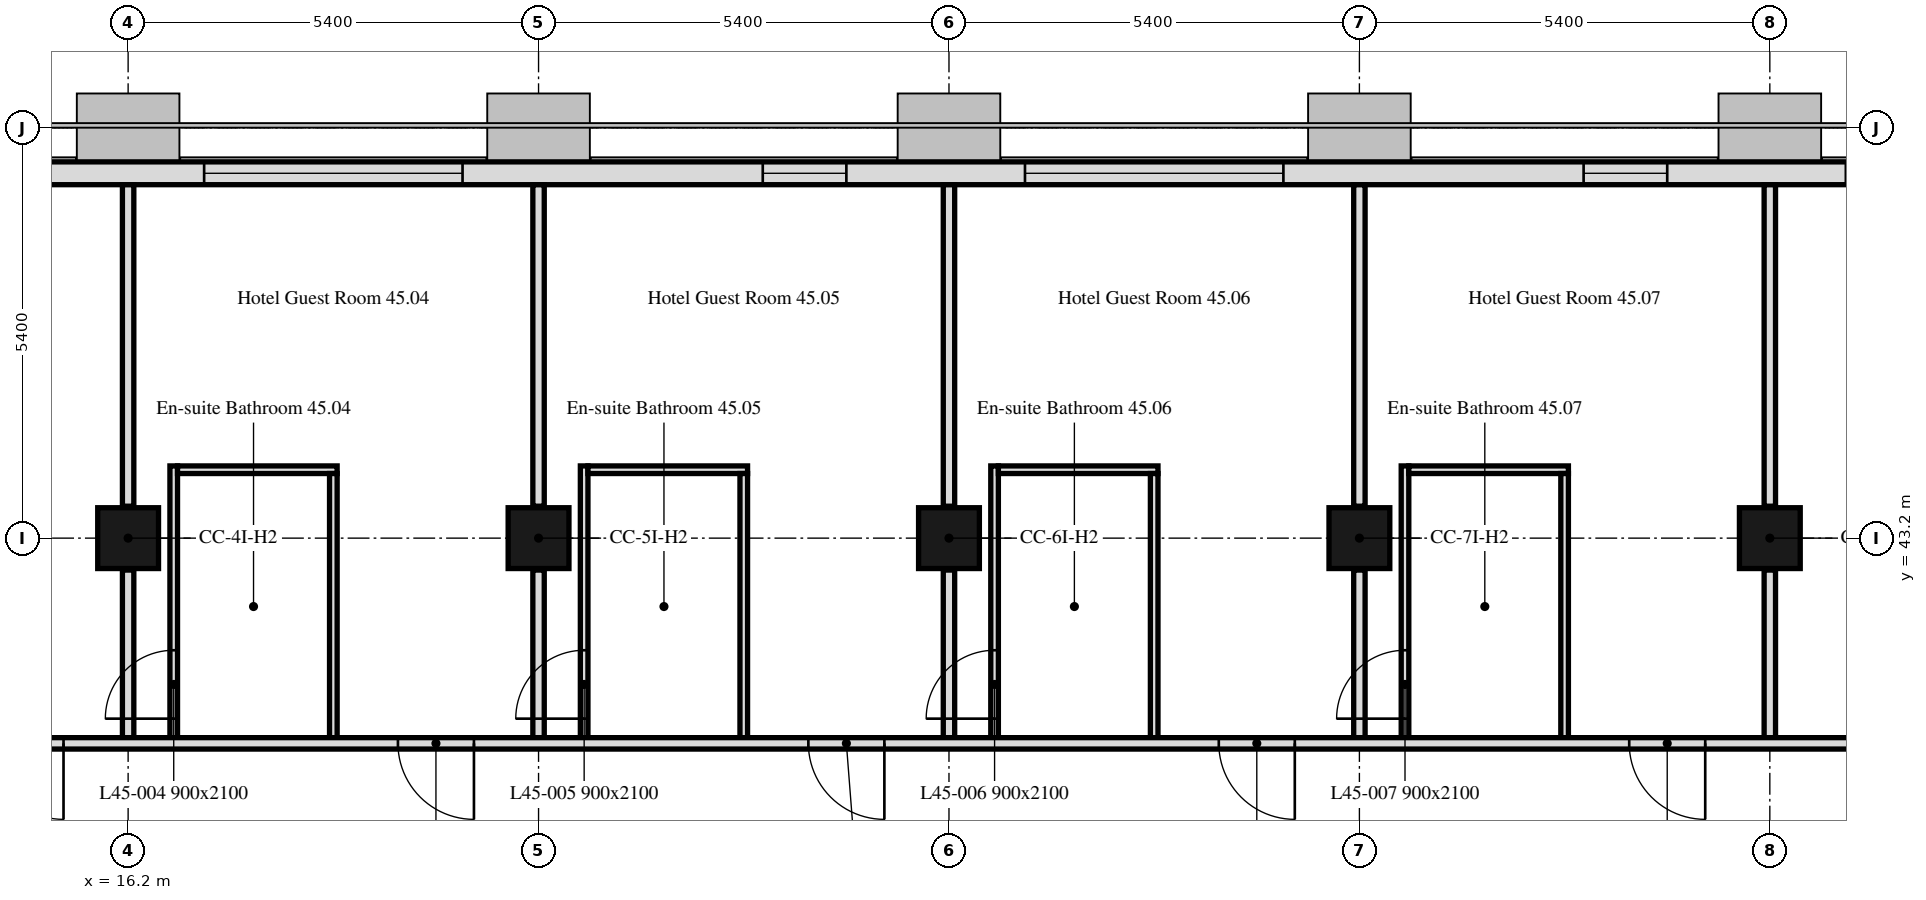
"""IFC4 building model, lengths in metres.
Left out: names, types, materials, properties, quantities, classifications, styles, units other than length and angle.
Written with IfcOpenShell. Run it as: python <this file> out.ifc"""

import sys

from ifc_helpers import new_model, si_unit, direction, frame, frame_2d, origin, origin_2d, place, context, subcontext, project, spatial, rectangle, extrude, element, fill, save


model = new_model("IFC4")
c1 = context("Model", 3, precision=1e-05, world=origin(), true_north=direction((0.0, 1.0)))
c2 = subcontext(c1, "Body", "Model", "MODEL_VIEW")
j1 = project(units=[si_unit("LENGTHUNIT", "METRE"), si_unit("PLANEANGLEUNIT", "RADIAN")], contexts=[c1])
p1 = place(None, origin())
s1 = spatial("IfcSite", under=j1, at=p1, CompositionType="ELEMENT")
p2 = place(p1, origin())
s2 = spatial("IfcBuilding", under=s1, at=p2, CompositionType="ELEMENT")
p3 = place(p2, frame((0.0, 0.0, 187.3)))
s3 = spatial("IfcBuildingStorey", under=s2, at=p3, CompositionType="ELEMENT", Elevation=187.3)
for number, where, z_axis, x_axis in (
    (1, (16.2, 43.2, 0.0), (0.0, 0.0, 1.0), (1.0, 0.0, 0.0)),
    (2, (21.6, 43.2, 0.0), (0.0, 0.0, 1.0), (1.0, 0.0, 0.0)),
    (3, (27.0, 43.2, 0.0), (0.0, 0.0, 1.0), (1.0, 0.0, 0.0)),
    (4, (32.4, 43.2, 0.0), (0.0, 0.0, 1.0), (1.0, 0.0, 0.0)),
    (5, (37.8, 43.2, 0.0), (0.0, 0.0, 1.0), (1.0, 0.0, 0.0)),
):
    element("IfcColumn", number, at=place(p3, frame(where, z_axis=z_axis, x_axis=x_axis)), inside=s3, PredefinedType="COLUMN", context=c2, shape_type="SweptSolid", body=[
        extrude(rectangle(XDim=0.8, YDim=0.8, at=origin_2d()), origin(), (0.0, 0.0, 1.0), 3.0),
    ])
p4 = place(p3, frame((43.014, 48.0, 0.0), z_axis=(0.0, 0.0, 1.0), x_axis=(-1.0, 0.0, 0.0)))
e6 = element("IfcWall", 6, at=p4, inside=s3, PredefinedType="SOLIDWALL", context=c2, shape_type="SweptSolid", body=[
    extrude(rectangle(XDim=32.027, YDim=0.3, at=frame_2d((16.014, 0.0))), origin(), (0.0, 0.0, 1.0), 3.0),
])
p5 = place(p4, frame((0.814, 0.0, 0.9)))
e7 = element("IfcOpeningElement", 7, at=p5, cuts=e6, PredefinedType="OPENING", context=c2, shape_type="SweptSolid", body=[
    extrude(rectangle(XDim=3.4, YDim=1.7, at=frame_2d((1.7, 0.85))), frame((0.0, 0.16, 0.0), z_axis=(0.0, -1.0, 0.0), x_axis=(1.0, 0.0, 0.0)), (0.0, 0.0, 1.0), 0.32),
])
p6 = place(p4, frame((6.564, 0.0, 0.9)))
e8 = element("IfcOpeningElement", 8, at=p6, cuts=e6, PredefinedType="OPENING", context=c2, shape_type="SweptSolid", body=[
    extrude(rectangle(XDim=1.1, YDim=1.7, at=frame_2d((0.55, 0.85))), frame((0.0, 0.16, 0.0), z_axis=(0.0, -1.0, 0.0), x_axis=(1.0, 0.0, 0.0)), (0.0, 0.0, 1.0), 0.32),
])
p7 = place(p4, frame((11.614, 0.0, 0.9)))
e9 = element("IfcOpeningElement", 9, at=p7, cuts=e6, PredefinedType="OPENING", context=c2, shape_type="SweptSolid", body=[
    extrude(rectangle(XDim=3.4, YDim=1.7, at=frame_2d((1.7, 0.85))), frame((0.0, 0.16, 0.0), z_axis=(0.0, -1.0, 0.0), x_axis=(1.0, 0.0, 0.0)), (0.0, 0.0, 1.0), 0.32),
])
p8 = place(p4, frame((17.364, 0.0, 0.9)))
e10 = element("IfcOpeningElement", 10, at=p8, cuts=e6, PredefinedType="OPENING", context=c2, shape_type="SweptSolid", body=[
    extrude(rectangle(XDim=1.1, YDim=1.7, at=frame_2d((0.55, 0.85))), frame((0.0, 0.16, 0.0), z_axis=(0.0, -1.0, 0.0), x_axis=(1.0, 0.0, 0.0)), (0.0, 0.0, 1.0), 0.32),
])
p9 = place(p4, frame((22.414, 0.0, 0.9)))
e11 = element("IfcOpeningElement", 11, at=p9, cuts=e6, PredefinedType="OPENING", context=c2, shape_type="SweptSolid", body=[
    extrude(rectangle(XDim=3.4, YDim=1.7, at=frame_2d((1.7, 0.85))), frame((0.0, 0.16, 0.0), z_axis=(0.0, -1.0, 0.0), x_axis=(1.0, 0.0, 0.0)), (0.0, 0.0, 1.0), 0.32),
])
p10 = place(p4, frame((28.164, 0.0, 0.9)))
e12 = element("IfcOpeningElement", 12, at=p10, cuts=e6, PredefinedType="OPENING", context=c2, shape_type="SweptSolid", body=[
    extrude(rectangle(XDim=1.1, YDim=1.7, at=frame_2d((0.55, 0.85))), frame((0.0, 0.16, 0.0), z_axis=(0.0, -1.0, 0.0), x_axis=(1.0, 0.0, 0.0)), (0.0, 0.0, 1.0), 0.32),
])
p11 = place(p3, frame((16.2, 40.575, 0.0), z_axis=(0.0, 0.0, 1.0), x_axis=(0.0, 1.0, 0.0)))
e13 = element("IfcWall", 13, at=p11, inside=s3, PredefinedType="PARTITIONING", context=c2, shape_type="SweptSolid", body=[
    extrude(rectangle(XDim=2.205, YDim=0.15, at=frame_2d((1.103, 0.0))), origin(), (0.0, 0.0, 1.0), 2.4),
])
p12 = place(p3, frame((16.2, 43.62, 0.0), z_axis=(0.0, 0.0, 1.0), x_axis=(0.0, 1.0, 0.0)))
e14 = element("IfcWall", 14, at=p12, inside=s3, PredefinedType="PARTITIONING", context=c2, shape_type="SweptSolid", body=[
    extrude(rectangle(XDim=4.229, YDim=0.15, at=frame_2d((2.115, 0.0))), origin(), (0.0, 0.0, 1.0), 2.4),
])
p13 = place(p3, frame((16.8, 40.575, 0.0), z_axis=(0.0, 0.0, 1.0), x_axis=(0.0, 1.0, 0.0)))
e15 = element("IfcWall", 15, at=p13, inside=s3, PredefinedType="PARTITIONING", context=c2, shape_type="SweptSolid", body=[
    extrude(rectangle(XDim=3.575, YDim=0.1, at=frame_2d((1.788, 0.0))), origin(), (0.0, 0.0, 1.0), 3.0),
])
p14 = place(p13, frame((0.25, 0.0, 0.0)))
e16 = element("IfcOpeningElement", 16, at=p14, cuts=e15, PredefinedType="OPENING", context=c2, shape_type="SweptSolid", body=[
    extrude(rectangle(XDim=0.9, YDim=2.1, at=frame_2d((0.45, 1.05))), frame((0.0, 0.05, 0.0), z_axis=(0.0, -1.0, 0.0), x_axis=(1.0, 0.0, 0.0)), (0.0, 0.0, 1.0), 0.1),
])
p15 = place(p3, frame((16.85, 44.1, 0.0), z_axis=(0.0, 0.0, 1.0), x_axis=(1.0, 0.0, 0.0)))
e17 = element("IfcWall", 17, at=p15, inside=s3, PredefinedType="PARTITIONING", context=c2, shape_type="SweptSolid", body=[
    extrude(rectangle(XDim=2.1, YDim=0.1, at=frame_2d((1.05, 0.0))), origin(), (0.0, 0.0, 1.0), 3.0),
])
p16 = place(p3, frame((18.9, 44.05, 0.0), z_axis=(0.0, 0.0, 1.0), x_axis=(0.0, -1.0, 0.0)))
e18 = element("IfcWall", 18, at=p16, inside=s3, PredefinedType="PARTITIONING", context=c2, shape_type="SweptSolid", body=[
    extrude(rectangle(XDim=3.475, YDim=0.1, at=frame_2d((1.738, 0.0))), origin(), (0.0, 0.0, 1.0), 3.0),
])
p17 = place(p3, frame((21.6, 40.575, 0.0), z_axis=(0.0, 0.0, 1.0), x_axis=(0.0, 1.0, 0.0)))
e19 = element("IfcWall", 19, at=p17, inside=s3, PredefinedType="PARTITIONING", context=c2, shape_type="SweptSolid", body=[
    extrude(rectangle(XDim=2.205, YDim=0.15, at=frame_2d((1.103, 0.0))), origin(), (0.0, 0.0, 1.0), 2.4),
])
p18 = place(p3, frame((21.6, 43.62, 0.0), z_axis=(0.0, 0.0, 1.0), x_axis=(0.0, 1.0, 0.0)))
e20 = element("IfcWall", 20, at=p18, inside=s3, PredefinedType="PARTITIONING", context=c2, shape_type="SweptSolid", body=[
    extrude(rectangle(XDim=4.229, YDim=0.15, at=frame_2d((2.115, 0.0))), origin(), (0.0, 0.0, 1.0), 2.4),
])
p19 = place(p3, frame((22.2, 40.575, 0.0), z_axis=(0.0, 0.0, 1.0), x_axis=(0.0, 1.0, 0.0)))
e21 = element("IfcWall", 21, at=p19, inside=s3, PredefinedType="PARTITIONING", context=c2, shape_type="SweptSolid", body=[
    extrude(rectangle(XDim=3.575, YDim=0.1, at=frame_2d((1.788, 0.0))), origin(), (0.0, 0.0, 1.0), 3.0),
])
p20 = place(p19, frame((0.25, 0.0, 0.0)))
e22 = element("IfcOpeningElement", 22, at=p20, cuts=e21, PredefinedType="OPENING", context=c2, shape_type="SweptSolid", body=[
    extrude(rectangle(XDim=0.9, YDim=2.1, at=frame_2d((0.45, 1.05))), frame((0.0, 0.05, 0.0), z_axis=(0.0, -1.0, 0.0), x_axis=(1.0, 0.0, 0.0)), (0.0, 0.0, 1.0), 0.1),
])
p21 = place(p3, frame((22.25, 44.1, 0.0), z_axis=(0.0, 0.0, 1.0), x_axis=(1.0, 0.0, 0.0)))
e23 = element("IfcWall", 23, at=p21, inside=s3, PredefinedType="PARTITIONING", context=c2, shape_type="SweptSolid", body=[
    extrude(rectangle(XDim=2.1, YDim=0.1, at=frame_2d((1.05, 0.0))), origin(), (0.0, 0.0, 1.0), 3.0),
])
p22 = place(p3, frame((24.3, 44.05, 0.0), z_axis=(0.0, 0.0, 1.0), x_axis=(0.0, -1.0, 0.0)))
e24 = element("IfcWall", 24, at=p22, inside=s3, PredefinedType="PARTITIONING", context=c2, shape_type="SweptSolid", body=[
    extrude(rectangle(XDim=3.475, YDim=0.1, at=frame_2d((1.738, 0.0))), origin(), (0.0, 0.0, 1.0), 3.0),
])
p23 = place(p3, frame((27.0, 40.575, 0.0), z_axis=(0.0, 0.0, 1.0), x_axis=(0.0, 1.0, 0.0)))
e25 = element("IfcWall", 25, at=p23, inside=s3, PredefinedType="PARTITIONING", context=c2, shape_type="SweptSolid", body=[
    extrude(rectangle(XDim=2.205, YDim=0.15, at=frame_2d((1.103, 0.0))), origin(), (0.0, 0.0, 1.0), 2.4),
])
p24 = place(p3, frame((27.0, 43.62, 0.0), z_axis=(0.0, 0.0, 1.0), x_axis=(0.0, 1.0, 0.0)))
e26 = element("IfcWall", 26, at=p24, inside=s3, PredefinedType="PARTITIONING", context=c2, shape_type="SweptSolid", body=[
    extrude(rectangle(XDim=4.229, YDim=0.15, at=frame_2d((2.115, 0.0))), origin(), (0.0, 0.0, 1.0), 2.4),
])
p25 = place(p3, frame((27.6, 40.575, 0.0), z_axis=(0.0, 0.0, 1.0), x_axis=(0.0, 1.0, 0.0)))
e27 = element("IfcWall", 27, at=p25, inside=s3, PredefinedType="PARTITIONING", context=c2, shape_type="SweptSolid", body=[
    extrude(rectangle(XDim=3.575, YDim=0.1, at=frame_2d((1.788, 0.0))), origin(), (0.0, 0.0, 1.0), 3.0),
])
p26 = place(p25, frame((0.25, 0.0, 0.0)))
e28 = element("IfcOpeningElement", 28, at=p26, cuts=e27, PredefinedType="OPENING", context=c2, shape_type="SweptSolid", body=[
    extrude(rectangle(XDim=0.9, YDim=2.1, at=frame_2d((0.45, 1.05))), frame((0.0, 0.05, 0.0), z_axis=(0.0, -1.0, 0.0), x_axis=(1.0, 0.0, 0.0)), (0.0, 0.0, 1.0), 0.1),
])
p27 = place(p3, frame((27.65, 44.1, 0.0), z_axis=(0.0, 0.0, 1.0), x_axis=(1.0, 0.0, 0.0)))
e29 = element("IfcWall", 29, at=p27, inside=s3, PredefinedType="PARTITIONING", context=c2, shape_type="SweptSolid", body=[
    extrude(rectangle(XDim=2.1, YDim=0.1, at=frame_2d((1.05, 0.0))), origin(), (0.0, 0.0, 1.0), 3.0),
])
p28 = place(p3, frame((29.7, 44.05, 0.0), z_axis=(0.0, 0.0, 1.0), x_axis=(0.0, -1.0, 0.0)))
e30 = element("IfcWall", 30, at=p28, inside=s3, PredefinedType="PARTITIONING", context=c2, shape_type="SweptSolid", body=[
    extrude(rectangle(XDim=3.475, YDim=0.1, at=frame_2d((1.738, 0.0))), origin(), (0.0, 0.0, 1.0), 3.0),
])
p29 = place(p3, frame((32.4, 40.575, 0.0), z_axis=(0.0, 0.0, 1.0), x_axis=(0.0, 1.0, 0.0)))
e31 = element("IfcWall", 31, at=p29, inside=s3, PredefinedType="PARTITIONING", context=c2, shape_type="SweptSolid", body=[
    extrude(rectangle(XDim=2.205, YDim=0.15, at=frame_2d((1.103, 0.0))), origin(), (0.0, 0.0, 1.0), 2.4),
])
p30 = place(p3, frame((32.4, 43.62, 0.0), z_axis=(0.0, 0.0, 1.0), x_axis=(0.0, 1.0, 0.0)))
e32 = element("IfcWall", 32, at=p30, inside=s3, PredefinedType="PARTITIONING", context=c2, shape_type="SweptSolid", body=[
    extrude(rectangle(XDim=4.229, YDim=0.15, at=frame_2d((2.115, 0.0))), origin(), (0.0, 0.0, 1.0), 2.4),
])
p31 = place(p3, frame((33.0, 40.575, 0.0), z_axis=(0.0, 0.0, 1.0), x_axis=(0.0, 1.0, 0.0)))
e33 = element("IfcWall", 33, at=p31, inside=s3, PredefinedType="PARTITIONING", context=c2, shape_type="SweptSolid", body=[
    extrude(rectangle(XDim=3.575, YDim=0.1, at=frame_2d((1.788, 0.0))), origin(), (0.0, 0.0, 1.0), 3.0),
])
p32 = place(p31, frame((0.25, 0.0, 0.0)))
e34 = element("IfcOpeningElement", 34, at=p32, cuts=e33, PredefinedType="OPENING", context=c2, shape_type="SweptSolid", body=[
    extrude(rectangle(XDim=0.9, YDim=2.1, at=frame_2d((0.45, 1.05))), frame((0.0, 0.05, 0.0), z_axis=(0.0, -1.0, 0.0), x_axis=(1.0, 0.0, 0.0)), (0.0, 0.0, 1.0), 0.1),
])
p33 = place(p3, frame((33.05, 44.1, 0.0), z_axis=(0.0, 0.0, 1.0), x_axis=(1.0, 0.0, 0.0)))
e35 = element("IfcWall", 35, at=p33, inside=s3, PredefinedType="PARTITIONING", context=c2, shape_type="SweptSolid", body=[
    extrude(rectangle(XDim=2.1, YDim=0.1, at=frame_2d((1.05, 0.0))), origin(), (0.0, 0.0, 1.0), 3.0),
])
p34 = place(p3, frame((35.1, 44.05, 0.0), z_axis=(0.0, 0.0, 1.0), x_axis=(0.0, -1.0, 0.0)))
e36 = element("IfcWall", 36, at=p34, inside=s3, PredefinedType="PARTITIONING", context=c2, shape_type="SweptSolid", body=[
    extrude(rectangle(XDim=3.475, YDim=0.1, at=frame_2d((1.738, 0.0))), origin(), (0.0, 0.0, 1.0), 3.0),
])
p35 = place(p3, frame((37.8, 40.575, 0.0), z_axis=(0.0, 0.0, 1.0), x_axis=(0.0, 1.0, 0.0)))
e37 = element("IfcWall", 37, at=p35, inside=s3, PredefinedType="PARTITIONING", context=c2, shape_type="SweptSolid", body=[
    extrude(rectangle(XDim=2.205, YDim=0.15, at=frame_2d((1.103, 0.0))), origin(), (0.0, 0.0, 1.0), 2.4),
])
p36 = place(p3, frame((37.8, 43.62, 0.0), z_axis=(0.0, 0.0, 1.0), x_axis=(0.0, 1.0, 0.0)))
e38 = element("IfcWall", 38, at=p36, inside=s3, PredefinedType="PARTITIONING", context=c2, shape_type="SweptSolid", body=[
    extrude(rectangle(XDim=4.229, YDim=0.15, at=frame_2d((2.115, 0.0))), origin(), (0.0, 0.0, 1.0), 2.4),
])
p37 = place(p3, frame((47.849, 40.5, 0.0), z_axis=(0.0, 0.0, 1.0), x_axis=(-1.0, 0.0, 0.0)))
e39 = element("IfcWall", 39, at=p37, inside=s3, PredefinedType="PARTITIONING", context=c2, shape_type="SweptSolid", body=[
    extrude(rectangle(XDim=41.698, YDim=0.15, at=frame_2d((20.849, 0.0))), origin(), (0.0, 0.0, 1.0), 2.4),
])
p38 = place(p37, frame((37.899, 0.0, 0.0)))
e40 = element("IfcOpeningElement", 40, at=p38, cuts=e39, PredefinedType="OPENING", context=c2, shape_type="SweptSolid", body=[
    extrude(rectangle(XDim=1.0, YDim=2.1, at=frame_2d((0.5, 1.05))), frame((0.0, 0.075, 0.0), z_axis=(0.0, -1.0, 0.0), x_axis=(1.0, 0.0, 0.0)), (0.0, 0.0, 1.0), 0.15),
])
p39 = place(p37, frame((32.499, 0.0, 0.0)))
e41 = element("IfcOpeningElement", 41, at=p39, cuts=e39, PredefinedType="OPENING", context=c2, shape_type="SweptSolid", body=[
    extrude(rectangle(XDim=1.0, YDim=2.1, at=frame_2d((0.5, 1.05))), frame((0.0, 0.075, 0.0), z_axis=(0.0, -1.0, 0.0), x_axis=(1.0, 0.0, 0.0)), (0.0, 0.0, 1.0), 0.15),
])
p40 = place(p37, frame((27.099, 0.0, 0.0)))
e42 = element("IfcOpeningElement", 42, at=p40, cuts=e39, PredefinedType="OPENING", context=c2, shape_type="SweptSolid", body=[
    extrude(rectangle(XDim=1.0, YDim=2.1, at=frame_2d((0.5, 1.05))), frame((0.0, 0.075, 0.0), z_axis=(0.0, -1.0, 0.0), x_axis=(1.0, 0.0, 0.0)), (0.0, 0.0, 1.0), 0.15),
])
p41 = place(p37, frame((21.699, 0.0, 0.0)))
e43 = element("IfcOpeningElement", 43, at=p41, cuts=e39, PredefinedType="OPENING", context=c2, shape_type="SweptSolid", body=[
    extrude(rectangle(XDim=1.0, YDim=2.1, at=frame_2d((0.5, 1.05))), frame((0.0, 0.075, 0.0), z_axis=(0.0, -1.0, 0.0), x_axis=(1.0, 0.0, 0.0)), (0.0, 0.0, 1.0), 0.15),
])
p42 = place(p37, frame((16.299, 0.0, 0.0)))
e44 = element("IfcOpeningElement", 44, at=p42, cuts=e39, PredefinedType="OPENING", context=c2, shape_type="SweptSolid", body=[
    extrude(rectangle(XDim=1.0, YDim=2.1, at=frame_2d((0.5, 1.05))), frame((0.0, 0.075, 0.0), z_axis=(0.0, -1.0, 0.0), x_axis=(1.0, 0.0, 0.0)), (0.0, 0.0, 1.0), 0.15),
])
p43 = place(p37, frame((10.899, 0.0, 0.0)))
e45 = element("IfcOpeningElement", 45, at=p43, cuts=e39, PredefinedType="OPENING", context=c2, shape_type="SweptSolid", body=[
    extrude(rectangle(XDim=1.0, YDim=2.1, at=frame_2d((0.5, 1.05))), frame((0.0, 0.075, 0.0), z_axis=(0.0, -1.0, 0.0), x_axis=(1.0, 0.0, 0.0)), (0.0, 0.0, 1.0), 0.15),
])
p44 = place(p37, frame((2.849, 0.0, 0.0)))
e46 = element("IfcOpeningElement", 46, at=p44, cuts=e39, PredefinedType="OPENING", context=c2, shape_type="SweptSolid", body=[
    extrude(rectangle(XDim=1.0, YDim=2.1, at=frame_2d((0.5, 1.05))), frame((0.0, 0.075, 0.0), z_axis=(0.0, -1.0, 0.0), x_axis=(1.0, 0.0, 0.0)), (0.0, 0.0, 1.0), 0.15),
])
p45 = place(p6, origin())
e47 = element("IfcWindow", 47, at=p45, inside=s3, PartitioningType="SINGLE_PANEL", PredefinedType="WINDOW", context=c2, shape_type="SweptSolid", body=[
    extrude(rectangle(XDim=1.1, YDim=1.7, at=frame_2d((0.55, 0.85))), frame((0.0, 0.03, 0.0), z_axis=(0.0, -1.0, 0.0), x_axis=(1.0, 0.0, 0.0)), (0.0, 0.0, 1.0), 0.06),
])
fill(e8, e47)
p46 = place(p7, origin())
e48 = element("IfcWindow", 48, at=p46, inside=s3, PartitioningType="SINGLE_PANEL", PredefinedType="WINDOW", context=c2, shape_type="SweptSolid", body=[
    extrude(rectangle(XDim=3.4, YDim=1.7, at=frame_2d((1.7, 0.85))), frame((0.0, 0.03, 0.0), z_axis=(0.0, -1.0, 0.0), x_axis=(1.0, 0.0, 0.0)), (0.0, 0.0, 1.0), 0.06),
])
fill(e9, e48)
p47 = place(p8, origin())
e49 = element("IfcWindow", 49, at=p47, inside=s3, PartitioningType="SINGLE_PANEL", PredefinedType="WINDOW", context=c2, shape_type="SweptSolid", body=[
    extrude(rectangle(XDim=1.1, YDim=1.7, at=frame_2d((0.55, 0.85))), frame((0.0, 0.03, 0.0), z_axis=(0.0, -1.0, 0.0), x_axis=(1.0, 0.0, 0.0)), (0.0, 0.0, 1.0), 0.06),
])
fill(e10, e49)
p48 = place(p9, origin())
e50 = element("IfcWindow", 50, at=p48, inside=s3, PartitioningType="SINGLE_PANEL", PredefinedType="WINDOW", context=c2, shape_type="SweptSolid", body=[
    extrude(rectangle(XDim=3.4, YDim=1.7, at=frame_2d((1.7, 0.85))), frame((0.0, 0.03, 0.0), z_axis=(0.0, -1.0, 0.0), x_axis=(1.0, 0.0, 0.0)), (0.0, 0.0, 1.0), 0.06),
])
fill(e11, e50)
p49 = place(p14, origin())
e51 = element("IfcDoor", 51, at=p49, inside=s3, OperationType="SINGLE_SWING_LEFT", PredefinedType="DOOR", context=c2, shape_type="SweptSolid", body=[
    extrude(rectangle(XDim=0.9, YDim=2.1, at=frame_2d((0.45, 1.05))), frame((0.0, 0.025, 0.0), z_axis=(0.0, -1.0, 0.0), x_axis=(1.0, 0.0, 0.0)), (0.0, 0.0, 1.0), 0.05),
])
fill(e16, e51)
p50 = place(p20, origin())
e52 = element("IfcDoor", 52, at=p50, inside=s3, OperationType="SINGLE_SWING_LEFT", PredefinedType="DOOR", context=c2, shape_type="SweptSolid", body=[
    extrude(rectangle(XDim=0.9, YDim=2.1, at=frame_2d((0.45, 1.05))), frame((0.0, 0.025, 0.0), z_axis=(0.0, -1.0, 0.0), x_axis=(1.0, 0.0, 0.0)), (0.0, 0.0, 1.0), 0.05),
])
fill(e22, e52)
p51 = place(p26, origin())
e53 = element("IfcDoor", 53, at=p51, inside=s3, OperationType="SINGLE_SWING_RIGHT", PredefinedType="DOOR", context=c2, shape_type="SweptSolid", body=[
    extrude(rectangle(XDim=0.9, YDim=2.1, at=frame_2d((0.45, 1.05))), frame((0.0, 0.025, 0.0), z_axis=(0.0, -1.0, 0.0), x_axis=(1.0, 0.0, 0.0)), (0.0, 0.0, 1.0), 0.05),
])
fill(e28, e53)
p52 = place(p32, origin())
e54 = element("IfcDoor", 54, at=p52, inside=s3, OperationType="SINGLE_SWING_RIGHT", PredefinedType="DOOR", context=c2, shape_type="SweptSolid", body=[
    extrude(rectangle(XDim=0.9, YDim=2.1, at=frame_2d((0.45, 1.05))), frame((0.0, 0.025, 0.0), z_axis=(0.0, -1.0, 0.0), x_axis=(1.0, 0.0, 0.0)), (0.0, 0.0, 1.0), 0.05),
])
fill(e34, e54)
p53 = place(p39, origin())
e55 = element("IfcDoor", 55, at=p53, inside=s3, OperationType="SINGLE_SWING_LEFT", PredefinedType="DOOR", context=c2, shape_type="SweptSolid", body=[
    extrude(rectangle(XDim=1.0, YDim=2.1, at=frame_2d((0.5, 1.05))), frame((0.0, 0.025, 0.0), z_axis=(0.0, -1.0, 0.0), x_axis=(1.0, 0.0, 0.0)), (0.0, 0.0, 1.0), 0.05),
])
fill(e41, e55)
p54 = place(p40, origin())
e56 = element("IfcDoor", 56, at=p54, inside=s3, OperationType="SINGLE_SWING_LEFT", PredefinedType="DOOR", context=c2, shape_type="SweptSolid", body=[
    extrude(rectangle(XDim=1.0, YDim=2.1, at=frame_2d((0.5, 1.05))), frame((0.0, 0.025, 0.0), z_axis=(0.0, -1.0, 0.0), x_axis=(1.0, 0.0, 0.0)), (0.0, 0.0, 1.0), 0.05),
])
fill(e42, e56)
p55 = place(p41, origin())
e57 = element("IfcDoor", 57, at=p55, inside=s3, OperationType="SINGLE_SWING_RIGHT", PredefinedType="DOOR", context=c2, shape_type="SweptSolid", body=[
    extrude(rectangle(XDim=1.0, YDim=2.1, at=frame_2d((0.5, 1.05))), frame((0.0, 0.025, 0.0), z_axis=(0.0, -1.0, 0.0), x_axis=(1.0, 0.0, 0.0)), (0.0, 0.0, 1.0), 0.05),
])
fill(e43, e57)
p56 = place(p42, origin())
e58 = element("IfcDoor", 58, at=p56, inside=s3, OperationType="SINGLE_SWING_RIGHT", PredefinedType="DOOR", context=c2, shape_type="SweptSolid", body=[
    extrude(rectangle(XDim=1.0, YDim=2.1, at=frame_2d((0.5, 1.05))), frame((0.0, 0.025, 0.0), z_axis=(0.0, -1.0, 0.0), x_axis=(1.0, 0.0, 0.0)), (0.0, 0.0, 1.0), 0.05),
])
fill(e44, e58)
p57 = place(p43, origin())
e59 = element("IfcDoor", 59, at=p57, inside=s3, OperationType="SINGLE_SWING_LEFT", PredefinedType="DOOR", context=c2, shape_type="SweptSolid", body=[
    extrude(rectangle(XDim=1.0, YDim=2.1, at=frame_2d((0.5, 1.05))), frame((0.0, 0.025, 0.0), z_axis=(0.0, -1.0, 0.0), x_axis=(1.0, 0.0, 0.0)), (0.0, 0.0, 1.0), 0.05),
])
fill(e45, e59)
save(model, sys.argv[1])
